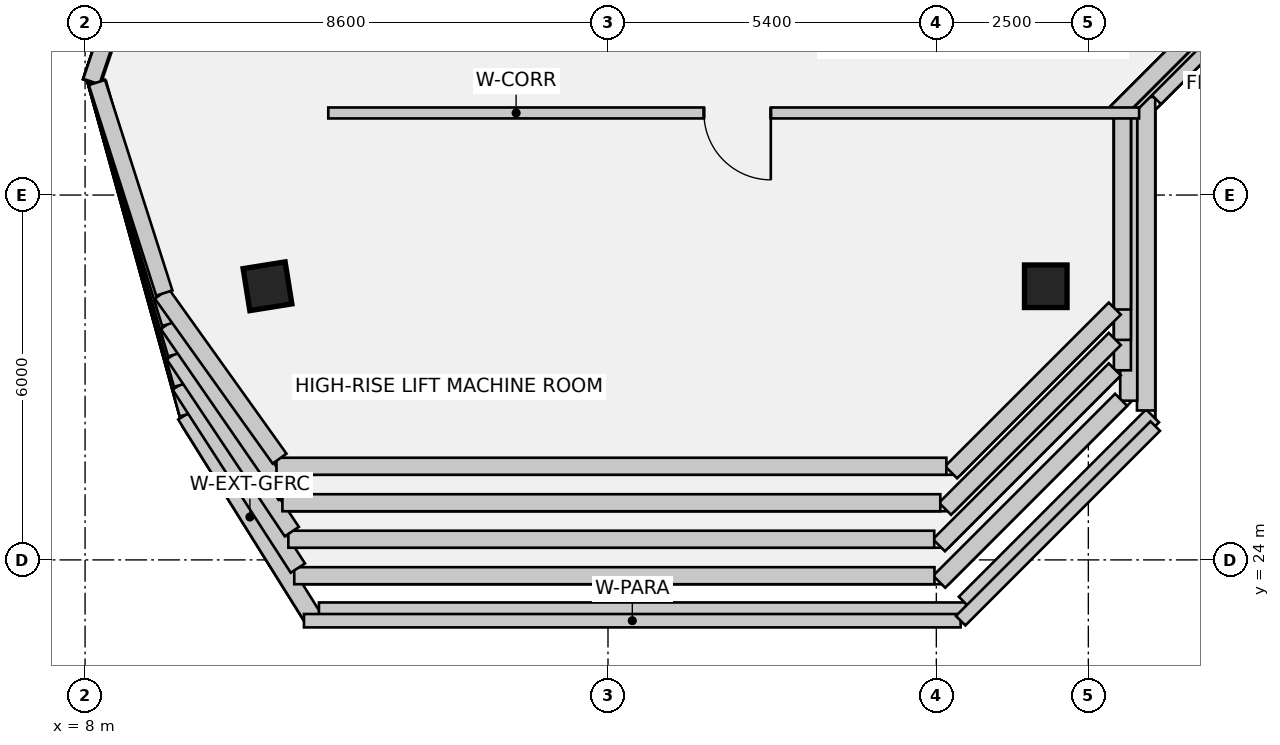
"""IFC4 building model, lengths in metres.
Left out: names, types, materials, properties, quantities, classifications, styles, units other than length and angle.
Written with IfcOpenShell. Run it as: python <this file> out.ifc"""

import sys

from ifc_helpers import new_model, si_unit, direction, frame, frame_2d, origin, origin_2d, place, context, subcontext, project, spatial, rectangle, extrude, source, transform, mapped, element, fill, save


model = new_model("IFC4")
c1 = context("Model", 3, precision=1e-05, world=origin(), true_north=direction((0.0, 1.0)))
c2 = subcontext(c1, "Body", "Model", "MODEL_VIEW")
j1 = project(units=[si_unit("LENGTHUNIT", "METRE"), si_unit("PLANEANGLEUNIT", "RADIAN")], contexts=[c1])
p1 = place(None, origin())
s1 = spatial("IfcSite", under=j1, at=p1, CompositionType="ELEMENT")
p2 = place(p1, origin())
s2 = spatial("IfcBuilding", under=s1, at=p2, CompositionType="ELEMENT")
p3 = place(p2, frame((0.0, 0.0, 309.5)))
s3 = spatial("IfcBuildingStorey", under=s2, at=p3, CompositionType="ELEMENT", Elevation=309.5)
m1 = source(origin(), c2, "Body", "SweptSolid", [
    extrude(rectangle(XDim=0.7, YDim=0.7, at=origin_2d()), origin(), (0.0, 0.0, 1.0), 5.4),
])
for number, where, z_axis, x_axis in (
    (1, (11.0, 28.5, 0.0), (0.0, 0.0, 1.0), (0.158, -0.987, 0.0)),
    (2, (23.8, 28.5, 0.0), (0.0, 0.0, 1.0), (1.0, 0.0, 0.0)),
):
    element("IfcColumn", number, at=place(p3, frame(where, z_axis=z_axis, x_axis=x_axis)), inside=s3, PredefinedType="COLUMN", context=c2, shape_type="MappedRepresentation", body=[
        mapped(m1, transform((0.0, 0.0, 0.0), scale=1.0)),
    ])
p4 = place(p3, frame((9.659, 26.388, 0.0), z_axis=(0.0, 0.0, 1.0), x_axis=(0.530015528288, -0.847987936101, 0.0)))
e3 = element("IfcWall", 3, at=p4, inside=s3, PredefinedType="SOLIDWALL", context=c2, shape_type="SweptSolid", body=[
    extrude(rectangle(XDim=3.969, YDim=0.3, at=frame_2d((1.984, 0.0))), origin(), (0.0, 0.0, 1.0), 5.1),
])
p5 = place(p3, frame((11.846, 23.15, 0.0), z_axis=(0.0, 0.0, 1.0), x_axis=(1.0, 0.0, 0.0)))
e4 = element("IfcWall", 4, at=p5, inside=s3, PredefinedType="SOLIDWALL", context=c2, shape_type="SweptSolid", body=[
    extrude(rectangle(XDim=10.642, YDim=0.3, at=frame_2d((5.321, 0.0))), origin(), (0.0, 0.0, 1.0), 5.1),
])
p6 = place(p3, frame((22.476, 23.288, 0.0), z_axis=(0.0, 0.0, 1.0), x_axis=(0.707134803727, 0.707078757535, 0.0)))
e5 = element("IfcWall", 5, at=p6, inside=s3, PredefinedType="SOLIDWALL", context=c2, shape_type="SweptSolid", body=[
    extrude(rectangle(XDim=4.356, YDim=0.3, at=frame_2d((2.178, 0.0))), origin(), (0.0, 0.0, 1.0), 5.1),
])
p7 = place(p3, frame((25.45, 26.457, 0.0), z_axis=(0.0, 0.0, 1.0), x_axis=(0.0, 1.0, 0.0)))
e6 = element("IfcWall", 6, at=p7, inside=s3, PredefinedType="SOLIDWALL", context=c2, shape_type="SweptSolid", body=[
    extrude(rectangle(XDim=5.155, YDim=0.3, at=frame_2d((2.577, 0.0))), origin(), (0.0, 0.0, 1.0), 5.1),
])
p8 = place(p3, frame((25.588, 31.6, 0.0), z_axis=(0.0, 0.0, 1.0), x_axis=(0.707106781187, 0.707106781187, 0.0)))
e7 = element("IfcWall", 7, at=p8, inside=s3, PredefinedType="SOLIDWALL", context=c2, shape_type="SweptSolid", body=[
    extrude(rectangle(XDim=2.907, YDim=0.3, at=frame_2d((1.454, 0.0))), origin(), (0.0, 0.0, 1.0), 5.1),
])
p9 = place(p3, frame((8.502, 33.019, 0.0), z_axis=(0.0, 0.0, 1.0), x_axis=(-0.319798692732, -0.947485512357, 0.0)))
e8 = element("IfcWall", 8, at=p9, inside=s3, PredefinedType="SOLIDWALL", context=c2, shape_type="SweptSolid", body=[
    extrude(rectangle(XDim=1.23, YDim=0.3, at=frame_2d((0.615, 0.0))), origin(), (0.0, 0.0, 1.0), 5.1),
])
p10 = place(p3, frame((8.201, 31.835, 0.0), z_axis=(0.0, 0.0, 1.0), x_axis=(0.265919285005, -0.963995297635, 0.0)))
e9 = element("IfcWall", 9, at=p10, inside=s3, PredefinedType="SOLIDWALL", context=c2, shape_type="SweptSolid", body=[
    extrude(rectangle(XDim=5.638, YDim=0.3, at=frame_2d((2.819, 0.0))), origin(), (0.0, 0.0, 1.0), 5.1),
])
p11 = place(p3, frame((11.6, 23.0, 5.4), z_axis=(0.0, 0.0, 1.0), x_axis=(1.0, 0.0, 0.0)))
e10 = element("IfcWall", 10, at=p11, inside=s3, PredefinedType="PARAPET", context=c2, shape_type="SweptSolid", body=[
    extrude(rectangle(XDim=10.8, YDim=0.22, at=frame_2d((5.4, 0.0))), origin(), (0.0, 0.0, 1.0), 0.95),
])
p12 = place(p3, frame((22.4, 23.0, 5.4), z_axis=(0.0, 0.0, 1.0), x_axis=(0.707133754038, 0.707079807306, 0.0)))
e11 = element("IfcWall", 11, at=p12, inside=s3, PredefinedType="PARAPET", context=c2, shape_type="SweptSolid", body=[
    extrude(rectangle(XDim=4.526, YDim=0.22, at=frame_2d((2.263, 0.0))), origin(), (0.0, 0.0, 1.0), 0.95),
])
p13 = place(p3, frame((8.102, 31.864, 5.4), z_axis=(0.0, 0.0, 1.0), x_axis=(0.319909448343, 0.947448122517, 0.0)))
e12 = element("IfcWall", 12, at=p13, inside=s3, PredefinedType="SOLIDWALL", context=c2, shape_type="SweptSolid", body=[
    extrude(rectangle(XDim=16.441, YDim=0.28, at=frame_2d((8.221, 0.0))), origin(), (0.0, 0.0, 1.0), 3.08),
])
p14 = place(p3, frame((27.121, 33.415, 5.4), z_axis=(0.0, 0.0, 1.0), x_axis=(-0.707106781187, -0.707106781187, 0.0)))
e13 = element("IfcWall", 13, at=p14, inside=s3, PredefinedType="SOLIDWALL", context=c2, shape_type="SweptSolid", body=[
    extrude(rectangle(XDim=2.908, YDim=0.28, at=frame_2d((1.454, 0.0))), origin(), (0.0, 0.0, 1.0), 3.08),
])
p15 = place(p3, frame((25.164, 31.281, 5.4), z_axis=(0.0, 0.0, 1.0), x_axis=(0.0, -1.0, 0.0)))
e14 = element("IfcWall", 14, at=p15, inside=s3, PredefinedType="SOLIDWALL", context=c2, shape_type="SweptSolid", body=[
    extrude(rectangle(XDim=4.663, YDim=0.28, at=frame_2d((2.332, 0.0))), origin(), (0.0, 0.0, 1.0), 3.08),
])
p16 = place(p3, frame((25.039, 26.633, 5.4), z_axis=(0.0, 0.0, 1.0), x_axis=(-0.707106781187, -0.707106781187, 0.0)))
e15 = element("IfcWall", 15, at=p16, inside=s3, PredefinedType="SOLIDWALL", context=c2, shape_type="SweptSolid", body=[
    extrude(rectangle(XDim=4.231, YDim=0.28, at=frame_2d((2.116, 0.0))), origin(), (0.0, 0.0, 1.0), 3.08),
])
p17 = place(p3, frame((21.969, 23.74, 5.4), z_axis=(0.0, 0.0, 1.0), x_axis=(-1.0, 0.0, 0.0)))
e16 = element("IfcWall", 16, at=p17, inside=s3, PredefinedType="SOLIDWALL", context=c2, shape_type="SweptSolid", body=[
    extrude(rectangle(XDim=10.529, YDim=0.28, at=frame_2d((5.265, 0.0))), origin(), (0.0, 0.0, 1.0), 3.08),
])
p18 = place(p3, frame((11.5, 23.865, 5.4), z_axis=(0.0, 0.0, 1.0), x_axis=(-0.542089622304, 0.840320677712, 0.0)))
e17 = element("IfcWall", 17, at=p18, inside=s3, PredefinedType="SOLIDWALL", context=c2, shape_type="SweptSolid", body=[
    extrude(rectangle(XDim=3.583, YDim=0.28, at=frame_2d((1.792, 0.0))), origin(), (0.0, 0.0, 1.0), 3.08),
])
p19 = place(p3, frame((9.597, 26.884, 5.4), z_axis=(0.0, 0.0, 1.0), x_axis=(-0.273003094154, 0.962013155098, 0.0)))
e18 = element("IfcWall", 18, at=p19, inside=s3, PredefinedType="SOLIDWALL", context=c2, shape_type="SweptSolid", body=[
    extrude(rectangle(XDim=5.163, YDim=0.28, at=frame_2d((2.581, 0.0))), origin(), (0.0, 0.0, 1.0), 3.08),
])
p20 = place(p3, frame((8.102, 31.865, 8.822), z_axis=(0.0, 0.0, 1.0), x_axis=(0.319909621118, 0.947448064179, 0.0)))
e19 = element("IfcWall", 19, at=p20, inside=s3, PredefinedType="SOLIDWALL", context=c2, shape_type="SweptSolid", body=[
    extrude(rectangle(XDim=16.441, YDim=0.28, at=frame_2d((8.22, 0.0))), origin(), (0.0, 0.0, 1.0), 4.158),
])
p21 = place(p3, frame((27.017, 33.415, 9.232), z_axis=(0.0, 0.0, 1.0), x_axis=(-0.707106781187, -0.707106781187, 0.0)))
e20 = element("IfcWall", 20, at=p21, inside=s3, PredefinedType="SOLIDWALL", context=c2, shape_type="SweptSolid", body=[
    extrude(rectangle(XDim=2.908, YDim=0.28, at=frame_2d((1.454, 0.0))), origin(), (0.0, 0.0, 1.0), 3.748),
])
p22 = place(p3, frame((25.06, 31.281, 9.128), z_axis=(0.0, 0.0, 1.0), x_axis=(0.0, -1.0, 0.0)))
e21 = element("IfcWall", 21, at=p22, inside=s3, PredefinedType="SOLIDWALL", context=c2, shape_type="SweptSolid", body=[
    extrude(rectangle(XDim=4.163, YDim=0.28, at=frame_2d((2.082, 0.0))), origin(), (0.0, 0.0, 1.0), 3.852),
])
p23 = place(p3, frame((24.935, 27.133, 8.98), z_axis=(0.0, 0.0, 1.0), x_axis=(-0.707106781187, -0.707106781187, 0.0)))
e22 = element("IfcWall", 22, at=p23, inside=s3, PredefinedType="SOLIDWALL", context=c2, shape_type="SweptSolid", body=[
    extrude(rectangle(XDim=4.09, YDim=0.28, at=frame_2d((2.045, 0.0))), origin(), (0.0, 0.0, 1.0), 4.0),
])
p24 = place(p3, frame((21.965, 24.34, 8.715), z_axis=(0.0, 0.0, 1.0), x_axis=(-1.0, 0.0, 0.0)))
e23 = element("IfcWall", 23, at=p24, inside=s3, PredefinedType="SOLIDWALL", context=c2, shape_type="SweptSolid", body=[
    extrude(rectangle(XDim=10.622, YDim=0.28, at=frame_2d((5.311, 0.0))), origin(), (0.0, 0.0, 1.0), 4.265),
])
p25 = place(p3, frame((11.4, 24.465, 8.719), z_axis=(0.0, 0.0, 1.0), x_axis=(-0.554700196225, 0.832050294338, 0.0)))
e24 = element("IfcWall", 24, at=p25, inside=s3, PredefinedType="SOLIDWALL", context=c2, shape_type="SweptSolid", body=[
    extrude(rectangle(XDim=3.499, YDim=0.28, at=frame_2d((1.75, 0.0))), origin(), (0.0, 0.0, 1.0), 4.261),
])
p26 = place(p3, frame((9.5, 27.385, 8.745), z_axis=(0.0, 0.0, 1.0), x_axis=(-0.281484518203, 0.959565769508, 0.0)))
e25 = element("IfcWall", 25, at=p26, inside=s3, PredefinedType="SOLIDWALL", context=c2, shape_type="SweptSolid", body=[
    extrude(rectangle(XDim=4.653, YDim=0.28, at=frame_2d((2.327, 0.0))), origin(), (0.0, 0.0, 1.0), 4.235),
])
p27 = place(p3, frame((8.102, 31.865, 13.312), z_axis=(0.0, 0.0, 1.0), x_axis=(0.31990979391, 0.947448005835, 0.0)))
e26 = element("IfcWall", 26, at=p27, inside=s3, PredefinedType="SOLIDWALL", context=c2, shape_type="SweptSolid", body=[
    extrude(rectangle(XDim=16.44, YDim=0.28, at=frame_2d((8.22, 0.0))), origin(), (0.0, 0.0, 1.0), 4.168),
])
p28 = place(p3, frame((27.017, 33.415, 13.73), z_axis=(0.0, 0.0, 1.0), x_axis=(-0.707106781187, -0.707106781187, 0.0)))
e27 = element("IfcWall", 27, at=p28, inside=s3, PredefinedType="SOLIDWALL", context=c2, shape_type="SweptSolid", body=[
    extrude(rectangle(XDim=2.908, YDim=0.28, at=frame_2d((1.454, 0.0))), origin(), (0.0, 0.0, 1.0), 3.75),
])
p29 = place(p3, frame((25.06, 31.281, 13.637), z_axis=(0.0, 0.0, 1.0), x_axis=(0.0, -1.0, 0.0)))
e28 = element("IfcWall", 28, at=p29, inside=s3, PredefinedType="SOLIDWALL", context=c2, shape_type="SweptSolid", body=[
    extrude(rectangle(XDim=3.663, YDim=0.28, at=frame_2d((1.832, 0.0))), origin(), (0.0, 0.0, 1.0), 3.843),
])
p30 = place(p3, frame((24.935, 27.633, 13.491), z_axis=(0.0, 0.0, 1.0), x_axis=(-0.707106781187, -0.707106781187, 0.0)))
e29 = element("IfcWall", 29, at=p30, inside=s3, PredefinedType="SOLIDWALL", context=c2, shape_type="SweptSolid", body=[
    extrude(rectangle(XDim=3.948, YDim=0.28, at=frame_2d((1.974, 0.0))), origin(), (0.0, 0.0, 1.0), 3.989),
])
p31 = place(p3, frame((22.065, 24.94, 13.215), z_axis=(0.0, 0.0, 1.0), x_axis=(-1.0, 0.0, 0.0)))
e30 = element("IfcWall", 30, at=p31, inside=s3, PredefinedType="SOLIDWALL", context=c2, shape_type="SweptSolid", body=[
    extrude(rectangle(XDim=10.82, YDim=0.28, at=frame_2d((5.41, 0.0))), origin(), (0.0, 0.0, 1.0), 4.265),
])
p32 = place(p3, frame((11.299, 25.065, 13.219), z_axis=(0.0, 0.0, 1.0), x_axis=(-0.567711242973, 0.823227759859, 0.0)))
e31 = element("IfcWall", 31, at=p32, inside=s3, PredefinedType="SOLIDWALL", context=c2, shape_type="SweptSolid", body=[
    extrude(rectangle(XDim=3.416, YDim=0.28, at=frame_2d((1.708, 0.0))), origin(), (0.0, 0.0, 1.0), 4.261),
])
p33 = place(p3, frame((9.401, 27.887, 13.243), z_axis=(0.0, 0.0, 1.0), x_axis=(-0.291874245808, 0.956456702958, 0.0)))
e32 = element("IfcWall", 32, at=p33, inside=s3, PredefinedType="SOLIDWALL", context=c2, shape_type="SweptSolid", body=[
    extrude(rectangle(XDim=4.144, YDim=0.28, at=frame_2d((2.072, 0.0))), origin(), (0.0, 0.0, 1.0), 4.237),
])
p34 = place(p3, frame((8.103, 31.866, 17.801), z_axis=(0.0, 0.0, 1.0), x_axis=(0.319914468152, 0.947446427545, 0.0)))
e33 = element("IfcWall", 33, at=p34, inside=s3, PredefinedType="SOLIDWALL", context=c2, shape_type="SweptSolid", body=[
    extrude(rectangle(XDim=16.439, YDim=0.28, at=frame_2d((8.219, 0.0))), origin(), (0.0, 0.0, 1.0), 3.56),
])
p35 = place(p3, frame((27.017, 33.415, 18.227), z_axis=(0.0, 0.0, 1.0), x_axis=(-0.707106781187, -0.707106781187, 0.0)))
e34 = element("IfcWall", 34, at=p35, inside=s3, PredefinedType="SOLIDWALL", context=c2, shape_type="SweptSolid", body=[
    extrude(rectangle(XDim=2.908, YDim=0.28, at=frame_2d((1.454, 0.0))), origin(), (0.0, 0.0, 1.0), 3.133),
])
p36 = place(p3, frame((25.06, 31.281, 18.145), z_axis=(0.0, 0.0, 1.0), x_axis=(0.0, -1.0, 0.0)))
e35 = element("IfcWall", 35, at=p36, inside=s3, PredefinedType="SOLIDWALL", context=c2, shape_type="SweptSolid", body=[
    extrude(rectangle(XDim=3.163, YDim=0.28, at=frame_2d((1.582, 0.0))), origin(), (0.0, 0.0, 1.0), 3.215),
])
p37 = place(p3, frame((24.935, 28.133, 18.002), z_axis=(0.0, 0.0, 1.0), x_axis=(-0.707106781187, -0.707106781187, 0.0)))
e36 = element("IfcWall", 36, at=p37, inside=s3, PredefinedType="SOLIDWALL", context=c2, shape_type="SweptSolid", body=[
    extrude(rectangle(XDim=3.807, YDim=0.28, at=frame_2d((1.904, 0.0))), origin(), (0.0, 0.0, 1.0), 3.358),
])
p38 = place(p3, frame((22.165, 25.54, 17.715), z_axis=(0.0, 0.0, 1.0), x_axis=(-1.0, 0.0, 0.0)))
e37 = element("IfcWall", 37, at=p38, inside=s3, PredefinedType="SOLIDWALL", context=c2, shape_type="SweptSolid", body=[
    extrude(rectangle(XDim=11.017, YDim=0.28, at=frame_2d((5.509, 0.0))), origin(), (0.0, 0.0, 1.0), 3.645),
])
p39 = place(p3, frame((11.199, 25.665, 17.719), z_axis=(0.0, 0.0, 1.0), x_axis=(-0.581252050314, 0.813723573461, 0.0)))
e38 = element("IfcWall", 38, at=p39, inside=s3, PredefinedType="SOLIDWALL", context=c2, shape_type="SweptSolid", body=[
    extrude(rectangle(XDim=3.333, YDim=0.28, at=frame_2d((1.667, 0.0))), origin(), (0.0, 0.0, 1.0), 3.641),
])
p40 = place(p3, frame((9.302, 28.389, 17.741), z_axis=(0.0, 0.0, 1.0), x_axis=(-0.304780600966, 0.95242258755, 0.0)))
e39 = element("IfcWall", 39, at=p40, inside=s3, PredefinedType="SOLIDWALL", context=c2, shape_type="SweptSolid", body=[
    extrude(rectangle(XDim=3.635, YDim=0.28, at=frame_2d((1.817, 0.0))), origin(), (0.0, 0.0, 1.0), 3.619),
])
p41 = place(p3, frame((25.335, 31.35, 0.0), z_axis=(0.0, 0.0, 1.0), x_axis=(-1.0, 0.0, 0.0)))
e40 = element("IfcWall", 40, at=p41, inside=s3, PredefinedType="PARTITIONING", context=c2, shape_type="SweptSolid", body=[
    extrude(rectangle(XDim=13.335, YDim=0.18, at=frame_2d((6.667, 0.0))), origin(), (0.0, 0.0, 1.0), 4.769),
])
m2 = source(origin(), c2, "Body", "SweptSolid", [
    extrude(rectangle(XDim=1.1, YDim=2.15, at=frame_2d((0.55, 1.075))), frame((0.0, 0.1, 0.0), z_axis=(0.0, -1.0, 0.0), x_axis=(1.0, 0.0, 0.0)), (0.0, 0.0, 1.0), 0.2),
])
p42 = place(p41, frame((6.057, 0.0, 0.0)))
e41 = element("IfcOpeningElement", 41, at=p42, cuts=e40, PredefinedType="OPENING", context=c2, shape_type="MappedRepresentation", body=[
    mapped(m2, transform((0.0, 0.0, 0.0), scale=1.0)),
])
m3 = source(origin(), c2, "Body", "SweptSolid", [
    extrude(rectangle(XDim=1.1, YDim=2.15, at=frame_2d((0.55, 1.075))), frame((0.0, 0.025, 0.0), z_axis=(0.0, -1.0, 0.0), x_axis=(1.0, 0.0, 0.0)), (0.0, 0.0, 1.0), 0.05),
])
p43 = place(p42, origin())
e42 = element("IfcDoor", 42, at=p43, inside=s3, OperationType="SINGLE_SWING_LEFT", PredefinedType="DOOR", context=c2, shape_type="MappedRepresentation", body=[
    mapped(m3, transform((0.0, 0.0, 0.0), scale=1.0)),
])
fill(e41, e42)
save(model, sys.argv[1])
